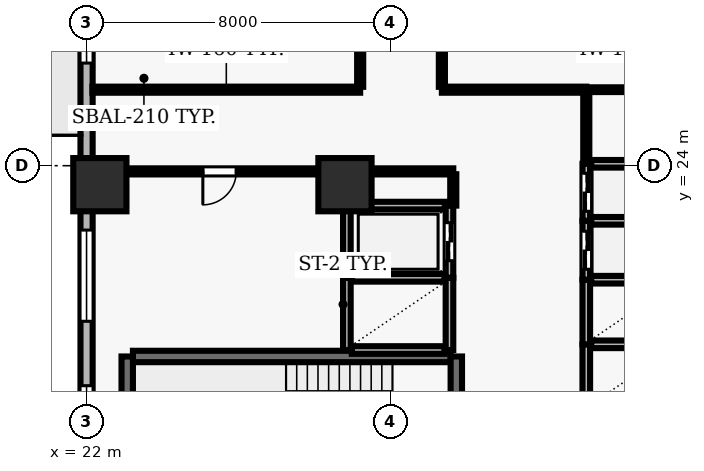
"""IFC4 building model, lengths in metres.
Left out: names, types, materials, properties, quantities, classifications, styles, units other than length and angle.
Written with IfcOpenShell. Run it as: python <this file> out.ifc"""

import sys

from ifc_helpers import new_model, si_unit, direction, frame, frame_2d, origin, origin_2d, place, context, subcontext, project, spatial, rectangle, extrude, element, fill, save


model = new_model("IFC4")
c1 = context("Model", 3, precision=1e-05, world=origin(), true_north=direction((0.0, 1.0)))
c2 = subcontext(c1, "Body", "Model", "MODEL_VIEW")
j1 = project(units=[si_unit("LENGTHUNIT", "METRE"), si_unit("PLANEANGLEUNIT", "RADIAN")], contexts=[c1])
p1 = place(None, origin())
s1 = spatial("IfcSite", under=j1, at=p1, CompositionType="ELEMENT")
p2 = place(p1, origin())
s2 = spatial("IfcBuilding", under=s1, at=p2, CompositionType="ELEMENT")
p3 = place(p2, frame((0.0, 0.0, 81.7)))
s3 = spatial("IfcBuildingStorey", under=s2, at=p3, CompositionType="ELEMENT", Elevation=81.7)
for number, where, z_axis, x_axis in (
    (1, (22.35, 23.5, 0.0), (0.0, 0.0, 1.0), (1.0, 0.0, 0.0)),
    (2, (28.8, 23.5, 0.0), (0.0, 0.0, 1.0), (1.0, 0.0, 0.0)),
):
    element("IfcColumn", number, at=place(p3, frame(where, z_axis=z_axis, x_axis=x_axis)), inside=s3, PredefinedType="COLUMN", context=c2, shape_type="SweptSolid", body=[
        extrude(rectangle(XDim=1.4, YDim=1.4, at=origin_2d()), origin(), (0.0, 0.0, 1.0), 3.9),
    ])
p4 = place(p3, frame((22.0, 51.5, 0.0), z_axis=(0.0, 0.0, 1.0), x_axis=(0.0, -1.0, 0.0)))
e3 = element("IfcWall", 3, at=p4, inside=s3, PredefinedType="SOLIDWALL", context=c2, shape_type="SweptSolid", body=[
    extrude(rectangle(XDim=49.0, YDim=0.32, at=frame_2d((24.5, 0.0))), origin(), (0.0, 0.0, 1.0), 3.69),
])
p5 = place(p4, frame((12.1, 0.0, 0.0)))
e4 = element("IfcOpeningElement", 4, at=p5, cuts=e3, PredefinedType="OPENING", context=c2, shape_type="SweptSolid", body=[
    extrude(rectangle(XDim=1.0, YDim=2.2, at=frame_2d((0.5, 1.1))), frame((0.0, 0.17, 0.0), z_axis=(0.0, -1.0, 0.0), x_axis=(1.0, 0.0, 0.0)), (0.0, 0.0, 1.0), 0.34),
])
p6 = place(p4, frame((1.522, 0.0, 0.9)))
e5 = element("IfcOpeningElement", 5, at=p6, cuts=e3, PredefinedType="OPENING", context=c2, shape_type="SweptSolid", body=[
    extrude(rectangle(XDim=2.4, YDim=1.8, at=frame_2d((1.2, 0.9))), frame((0.0, 0.17, 0.0), z_axis=(0.0, -1.0, 0.0), x_axis=(1.0, 0.0, 0.0)), (0.0, 0.0, 1.0), 0.34),
])
p7 = place(p4, frame((6.967, 0.0, 0.9)))
e6 = element("IfcOpeningElement", 6, at=p7, cuts=e3, PredefinedType="OPENING", context=c2, shape_type="SweptSolid", body=[
    extrude(rectangle(XDim=2.4, YDim=1.8, at=frame_2d((1.2, 0.9))), frame((0.0, 0.17, 0.0), z_axis=(0.0, -1.0, 0.0), x_axis=(1.0, 0.0, 0.0)), (0.0, 0.0, 1.0), 0.34),
])
p8 = place(p4, frame((22.4, 0.0, 0.9)))
e7 = element("IfcOpeningElement", 7, at=p8, cuts=e3, PredefinedType="OPENING", context=c2, shape_type="SweptSolid", body=[
    extrude(rectangle(XDim=2.4, YDim=1.8, at=frame_2d((1.2, 0.9))), frame((0.0, 0.17, 0.0), z_axis=(0.0, -1.0, 0.0), x_axis=(1.0, 0.0, 0.0)), (0.0, 0.0, 1.0), 0.34),
])
p9 = place(p4, frame((29.194, 0.0, 0.9)))
e8 = element("IfcOpeningElement", 8, at=p9, cuts=e3, PredefinedType="OPENING", context=c2, shape_type="SweptSolid", body=[
    extrude(rectangle(XDim=2.4, YDim=1.8, at=frame_2d((1.2, 0.9))), frame((0.0, 0.17, 0.0), z_axis=(0.0, -1.0, 0.0), x_axis=(1.0, 0.0, 0.0)), (0.0, 0.0, 1.0), 0.34),
])
p10 = place(p4, frame((33.289, 0.0, 0.9)))
e9 = element("IfcOpeningElement", 9, at=p10, cuts=e3, PredefinedType="OPENING", context=c2, shape_type="SweptSolid", body=[
    extrude(rectangle(XDim=2.4, YDim=1.8, at=frame_2d((1.2, 0.9))), frame((0.0, 0.17, 0.0), z_axis=(0.0, -1.0, 0.0), x_axis=(1.0, 0.0, 0.0)), (0.0, 0.0, 1.0), 0.34),
])
p11 = place(p4, frame((39.633, 0.0, 0.9)))
e10 = element("IfcOpeningElement", 10, at=p11, cuts=e3, PredefinedType="OPENING", context=c2, shape_type="SweptSolid", body=[
    extrude(rectangle(XDim=2.4, YDim=1.8, at=frame_2d((1.2, 0.9))), frame((0.0, 0.17, 0.0), z_axis=(0.0, -1.0, 0.0), x_axis=(1.0, 0.0, 0.0)), (0.0, 0.0, 1.0), 0.34),
])
p12 = place(p3, frame((31.58, 18.98, 0.0), z_axis=(0.0, 0.0, 1.0), x_axis=(-1.0, 0.0, 0.0)))
e11 = element("IfcWall", 11, at=p12, inside=s3, PredefinedType="SHEAR", context=c2, shape_type="SweptSolid", body=[
    extrude(rectangle(XDim=8.36, YDim=0.3, at=frame_2d((4.18, 0.0))), origin(), (0.0, 0.0, 1.0), 3.69),
])
p13 = place(p3, frame((23.07, 18.98, 0.0), z_axis=(0.0, 0.0, 1.0), x_axis=(0.0, -1.0, 0.0)))
e12 = element("IfcWall", 12, at=p13, inside=s3, PredefinedType="SHEAR", context=c2, shape_type="SweptSolid", body=[
    extrude(rectangle(XDim=3.51, YDim=0.3, at=frame_2d((1.755, 0.0))), origin(), (0.0, 0.0, 1.0), 3.69),
])
p14 = place(p3, frame((31.73, 15.47, 0.0), z_axis=(0.0, 0.0, 1.0), x_axis=(0.0, 1.0, 0.0)))
e13 = element("IfcWall", 13, at=p14, inside=s3, PredefinedType="SHEAR", context=c2, shape_type="SweptSolid", body=[
    extrude(rectangle(XDim=3.51, YDim=0.3, at=frame_2d((1.755, 0.0))), origin(), (0.0, 0.0, 1.0), 3.69),
])
p15 = place(p14, frame((1.18, 0.0, 0.0)))
e14 = element("IfcOpeningElement", 14, at=p15, cuts=e13, PredefinedType="OPENING", context=c2, shape_type="SweptSolid", body=[
    extrude(rectangle(XDim=1.15, YDim=2.15, at=frame_2d((0.575, 1.075))), frame((0.0, 0.16, 0.0), z_axis=(0.0, -1.0, 0.0), x_axis=(1.0, 0.0, 0.0)), (0.0, 0.0, 1.0), 0.32),
])
p16 = place(p3, frame((35.15, 19.3, 0.0), z_axis=(0.0, 0.0, 1.0), x_axis=(0.0, -1.0, 0.0)))
e15 = element("IfcWall", 15, at=p16, inside=s3, PredefinedType="SOLIDWALL", context=c2, shape_type="SweptSolid", body=[
    extrude(rectangle(XDim=1.7, YDim=0.2, at=frame_2d((0.85, 0.0))), origin(), (0.0, 0.0, 1.0), 3.69),
])
p17 = place(p3, frame((37.42, 19.3, 0.0), z_axis=(0.0, 0.0, 1.0), x_axis=(-1.0, 0.0, 0.0)))
e16 = element("IfcWall", 16, at=p17, inside=s3, PredefinedType="SOLIDWALL", context=c2, shape_type="SweptSolid", body=[
    extrude(rectangle(XDim=2.14, YDim=0.2, at=frame_2d((1.07, 0.0))), origin(), (0.0, 0.0, 1.0), 3.69),
])
p18 = place(p3, frame((35.15, 21.0, 0.0), z_axis=(0.0, 0.0, 1.0), x_axis=(0.0, -1.0, 0.0)))
e17 = element("IfcWall", 17, at=p18, inside=s3, PredefinedType="SOLIDWALL", context=c2, shape_type="SweptSolid", body=[
    extrude(rectangle(XDim=1.7, YDim=0.2, at=frame_2d((0.85, 0.0))), origin(), (0.0, 0.0, 1.0), 3.69),
])
p19 = place(p3, frame((37.42, 21.0, 0.0), z_axis=(0.0, 0.0, 1.0), x_axis=(-1.0, 0.0, 0.0)))
e18 = element("IfcWall", 18, at=p19, inside=s3, PredefinedType="SOLIDWALL", context=c2, shape_type="SweptSolid", body=[
    extrude(rectangle(XDim=2.14, YDim=0.2, at=frame_2d((1.07, 0.0))), origin(), (0.0, 0.0, 1.0), 3.69),
])
for number, where, z_axis, x_axis in (
    (19, (28.85, 21.05, 0.0), (0.0, 0.0, 1.0), (0.0, -1.0, 0.0)),
    (20, (31.55, 19.15, 0.0), (0.0, 0.0, 1.0), (0.0, 1.0, 0.0)),
):
    element("IfcWall", number, at=place(p3, frame(where, z_axis=z_axis, x_axis=x_axis)), inside=s3, PredefinedType="SOLIDWALL", context=c2, shape_type="SweptSolid", body=[
        extrude(rectangle(XDim=1.9, YDim=0.2, at=frame_2d((0.95, 0.0))), origin(), (0.0, 0.0, 1.0), 3.69),
    ])
for number, where, z_axis, x_axis in (
    (21, (28.98, 19.15, 0.0), (0.0, 0.0, 1.0), (1.0, 0.0, 0.0)),
    (22, (31.42, 21.05, 0.0), (0.0, 0.0, 1.0), (-1.0, 0.0, 0.0)),
):
    element("IfcWall", number, at=place(p3, frame(where, z_axis=z_axis, x_axis=x_axis)), inside=s3, PredefinedType="SOLIDWALL", context=c2, shape_type="SweptSolid", body=[
        extrude(rectangle(XDim=2.44, YDim=0.2, at=frame_2d((1.22, 0.0))), origin(), (0.0, 0.0, 1.0), 3.69),
    ])
p20 = place(p3, frame((35.15, 22.55, 0.0), z_axis=(0.0, 0.0, 1.0), x_axis=(0.0, -1.0, 0.0)))
e23 = element("IfcWall", 23, at=p20, inside=s3, PredefinedType="SOLIDWALL", context=c2, shape_type="SweptSolid", body=[
    extrude(rectangle(XDim=1.55, YDim=0.2, at=frame_2d((0.775, 0.0))), origin(), (0.0, 0.0, 1.0), 3.69),
])
p21 = place(p20, frame((0.275, 0.0, 0.0)))
e24 = element("IfcOpeningElement", 24, at=p21, cuts=e23, PredefinedType="OPENING", context=c2, shape_type="SweptSolid", body=[
    extrude(rectangle(XDim=1.0, YDim=2.1, at=frame_2d((0.5, 1.05))), frame((0.0, 0.11, 0.0), z_axis=(0.0, -1.0, 0.0), x_axis=(1.0, 0.0, 0.0)), (0.0, 0.0, 1.0), 0.22),
])
p22 = place(p3, frame((37.42, 22.55, 0.0), z_axis=(0.0, 0.0, 1.0), x_axis=(-1.0, 0.0, 0.0)))
e25 = element("IfcWall", 25, at=p22, inside=s3, PredefinedType="SOLIDWALL", context=c2, shape_type="SweptSolid", body=[
    extrude(rectangle(XDim=2.14, YDim=0.2, at=frame_2d((1.07, 0.0))), origin(), (0.0, 0.0, 1.0), 3.69),
])
p23 = place(p3, frame((35.15, 24.05, 0.0), z_axis=(0.0, 0.0, 1.0), x_axis=(0.0, -1.0, 0.0)))
e26 = element("IfcWall", 26, at=p23, inside=s3, PredefinedType="SOLIDWALL", context=c2, shape_type="SweptSolid", body=[
    extrude(rectangle(XDim=1.5, YDim=0.2, at=frame_2d((0.75, 0.0))), origin(), (0.0, 0.0, 1.0), 3.69),
])
p24 = place(p23, frame((0.25, 0.0, 0.0)))
e27 = element("IfcOpeningElement", 27, at=p24, cuts=e26, PredefinedType="OPENING", context=c2, shape_type="SweptSolid", body=[
    extrude(rectangle(XDim=1.0, YDim=2.1, at=frame_2d((0.5, 1.05))), frame((0.0, 0.11, 0.0), z_axis=(0.0, -1.0, 0.0), x_axis=(1.0, 0.0, 0.0)), (0.0, 0.0, 1.0), 0.22),
])
p25 = place(p3, frame((37.42, 24.05, 0.0), z_axis=(0.0, 0.0, 1.0), x_axis=(-1.0, 0.0, 0.0)))
e28 = element("IfcWall", 28, at=p25, inside=s3, PredefinedType="SOLIDWALL", context=c2, shape_type="SweptSolid", body=[
    extrude(rectangle(XDim=2.14, YDim=0.2, at=frame_2d((1.07, 0.0))), origin(), (0.0, 0.0, 1.0), 3.69),
])
p26 = place(p3, frame((28.85, 22.95, 0.0), z_axis=(0.0, 0.0, 1.0), x_axis=(0.0, -1.0, 0.0)))
e29 = element("IfcWall", 29, at=p26, inside=s3, PredefinedType="SOLIDWALL", context=c2, shape_type="SweptSolid", body=[
    extrude(rectangle(XDim=1.9, YDim=0.2, at=frame_2d((0.95, 0.0))), origin(), (0.0, 0.0, 1.0), 3.69),
])
p27 = place(p3, frame((31.55, 21.05, 0.0), z_axis=(0.0, 0.0, 1.0), x_axis=(0.0, 1.0, 0.0)))
e30 = element("IfcWall", 30, at=p27, inside=s3, PredefinedType="SOLIDWALL", context=c2, shape_type="SweptSolid", body=[
    extrude(rectangle(XDim=1.9, YDim=0.2, at=frame_2d((0.95, 0.0))), origin(), (0.0, 0.0, 1.0), 3.69),
])
p28 = place(p27, frame((0.45, 0.0, 0.0)))
e31 = element("IfcOpeningElement", 31, at=p28, cuts=e30, PredefinedType="OPENING", context=c2, shape_type="SweptSolid", body=[
    extrude(rectangle(XDim=1.0, YDim=2.1, at=frame_2d((0.5, 1.05))), frame((0.0, 0.11, 0.0), z_axis=(0.0, -1.0, 0.0), x_axis=(1.0, 0.0, 0.0)), (0.0, 0.0, 1.0), 0.22),
])
p29 = place(p3, frame((31.43, 22.95, 0.0), z_axis=(0.0, 0.0, 1.0), x_axis=(-1.0, 0.0, 0.0)))
e32 = element("IfcWall", 32, at=p29, inside=s3, PredefinedType="SOLIDWALL", context=c2, shape_type="SweptSolid", body=[
    extrude(rectangle(XDim=2.46, YDim=0.2, at=frame_2d((1.23, 0.0))), origin(), (0.0, 0.0, 1.0), 3.69),
])
p30 = place(p3, frame((28.8, 23.85, 0.0), z_axis=(0.0, 0.0, 1.0), x_axis=(-1.0, 0.0, 0.0)))
e33 = element("IfcWall", 33, at=p30, inside=s3, PredefinedType="PARTITIONING", context=c2, shape_type="SweptSolid", body=[
    extrude(rectangle(XDim=6.6, YDim=0.16, at=frame_2d((3.3, 0.0))), origin(), (0.0, 0.0, 1.0), 3.055),
])
p31 = place(p30, frame((2.86, 0.0, 0.0)))
e34 = element("IfcOpeningElement", 34, at=p31, cuts=e33, PredefinedType="OPENING", context=c2, shape_type="SweptSolid", body=[
    extrude(rectangle(XDim=0.88, YDim=2.1, at=frame_2d((0.44, 1.05))), frame((0.0, 0.09, 0.0), z_axis=(0.0, -1.0, 0.0), x_axis=(1.0, 0.0, 0.0)), (0.0, 0.0, 1.0), 0.18),
])
p32 = place(p3, frame((28.8, 23.85, 0.0), z_axis=(0.0, 0.0, 1.0), x_axis=(1.0, 0.0, 0.0)))
e35 = element("IfcWall", 35, at=p32, inside=s3, PredefinedType="PARTITIONING", context=c2, shape_type="SweptSolid", body=[
    extrude(rectangle(XDim=2.85, YDim=0.16, at=frame_2d((1.425, 0.0))), origin(), (0.0, 0.0, 1.0), 3.69),
])
p33 = place(p3, frame((29.2, 26.0, 0.0), z_axis=(0.0, 0.0, 1.0), x_axis=(-1.0, 0.0, 0.0)))
e36 = element("IfcWall", 36, at=p33, inside=s3, PredefinedType="PARTITIONING", context=c2, shape_type="SweptSolid", body=[
    extrude(rectangle(XDim=7.045, YDim=0.16, at=frame_2d((3.522, 0.0))), origin(), (0.0, 0.0, 1.0), 3.69),
])
p34 = place(p3, frame((35.15, 26.0, 0.0), z_axis=(0.0, 0.0, 1.0), x_axis=(-1.0, 0.0, 0.0)))
e37 = element("IfcWall", 37, at=p34, inside=s3, PredefinedType="PARTITIONING", context=c2, shape_type="SweptSolid", body=[
    extrude(rectangle(XDim=3.8, YDim=0.16, at=frame_2d((1.9, 0.0))), origin(), (0.0, 0.0, 1.0), 3.69),
])
p35 = place(p3, frame((35.15, 26.0, 0.0), z_axis=(0.0, 0.0, 1.0), x_axis=(1.0, 0.0, 0.0)))
e38 = element("IfcWall", 38, at=p35, inside=s3, PredefinedType="PARTITIONING", context=c2, shape_type="SweptSolid", body=[
    extrude(rectangle(XDim=2.695, YDim=0.125, at=frame_2d((1.348, 0.0))), origin(), (0.0, 0.0, 1.0), 3.69),
])
p36 = place(p3, frame((28.8, 22.95, 0.0), z_axis=(0.0, 0.0, 1.0), x_axis=(0.0, 1.0, 0.0)))
e39 = element("IfcWall", 39, at=p36, inside=s3, PredefinedType="PARTITIONING", context=c2, shape_type="SweptSolid", body=[
    extrude(rectangle(XDim=0.825, YDim=0.135, at=frame_2d((0.413, 0.0))), origin(), (0.0, 0.0, 1.0), 3.69),
])
p37 = place(p3, frame((29.2, 33.195, 0.0), z_axis=(0.0, 0.0, 1.0), x_axis=(0.0, -1.0, 0.0)))
e40 = element("IfcWall", 40, at=p37, inside=s3, PredefinedType="PARTITIONING", context=c2, shape_type="SweptSolid", body=[
    extrude(rectangle(XDim=7.12, YDim=0.16, at=frame_2d((3.56, 0.0))), origin(), (0.0, 0.0, 1.0), 3.69),
])
p38 = place(p37, frame((3.11, 0.0, 0.0)))
e41 = element("IfcOpeningElement", 41, at=p38, cuts=e40, PredefinedType="OPENING", context=c2, shape_type="SweptSolid", body=[
    extrude(rectangle(XDim=0.9, YDim=2.1, at=frame_2d((0.45, 1.05))), frame((0.0, 0.09, 0.0), z_axis=(0.0, -1.0, 0.0), x_axis=(1.0, 0.0, 0.0)), (0.0, 0.0, 1.0), 0.18),
])
p39 = place(p3, frame((31.35, 26.075, 0.0), z_axis=(0.0, 0.0, 1.0), x_axis=(0.0, 1.0, 0.0)))
e42 = element("IfcWall", 42, at=p39, inside=s3, PredefinedType="PARTITIONING", context=c2, shape_type="SweptSolid", body=[
    extrude(rectangle(XDim=7.137, YDim=0.16, at=frame_2d((3.568, 0.0))), origin(), (0.0, 0.0, 1.0), 3.69),
])
p40 = place(p39, frame((3.119, 0.0, 0.0)))
e43 = element("IfcOpeningElement", 43, at=p40, cuts=e42, PredefinedType="OPENING", context=c2, shape_type="SweptSolid", body=[
    extrude(rectangle(XDim=0.9, YDim=2.1, at=frame_2d((0.45, 1.05))), frame((0.0, 0.09, 0.0), z_axis=(0.0, -1.0, 0.0), x_axis=(1.0, 0.0, 0.0)), (0.0, 0.0, 1.0), 0.18),
])
p41 = place(p3, frame((31.65, 23.775, 0.0), z_axis=(0.0, 0.0, 1.0), x_axis=(0.0, -1.0, 0.0)))
e44 = element("IfcWall", 44, at=p41, inside=s3, PredefinedType="PARTITIONING", context=c2, shape_type="SweptSolid", body=[
    extrude(rectangle(XDim=0.825, YDim=0.16, at=frame_2d((0.413, 0.0))), origin(), (0.0, 0.0, 1.0), 3.69),
])
p42 = place(p3, frame((35.15, 24.07, 0.0), z_axis=(0.0, 0.0, 1.0), x_axis=(0.0, 1.0, 0.0)))
e45 = element("IfcWall", 45, at=p42, inside=s3, PredefinedType="PARTITIONING", context=c2, shape_type="SweptSolid", body=[
    extrude(rectangle(XDim=1.855, YDim=0.16, at=frame_2d((0.927, 0.0))), origin(), (0.0, 0.0, 1.0), 3.69),
])
p43 = place(p8, origin())
e46 = element("IfcWindow", 46, at=p43, inside=s3, PartitioningType="SINGLE_PANEL", PredefinedType="WINDOW", context=c2, shape_type="SweptSolid", body=[
    extrude(rectangle(XDim=2.4, YDim=1.8, at=frame_2d((1.2, 0.9))), frame((0.0, 0.03, 0.0), z_axis=(0.0, -1.0, 0.0), x_axis=(1.0, 0.0, 0.0)), (0.0, 0.0, 1.0), 0.06),
])
fill(e7, e46)
p44 = place(p9, origin())
e47 = element("IfcWindow", 47, at=p44, inside=s3, PartitioningType="SINGLE_PANEL", PredefinedType="WINDOW", context=c2, shape_type="SweptSolid", body=[
    extrude(rectangle(XDim=2.4, YDim=1.8, at=frame_2d((1.2, 0.9))), frame((0.0, 0.03, 0.0), z_axis=(0.0, -1.0, 0.0), x_axis=(1.0, 0.0, 0.0)), (0.0, 0.0, 1.0), 0.06),
])
fill(e8, e47)
p45 = place(p10, origin())
e48 = element("IfcWindow", 48, at=p45, inside=s3, PartitioningType="SINGLE_PANEL", PredefinedType="WINDOW", context=c2, shape_type="SweptSolid", body=[
    extrude(rectangle(XDim=2.4, YDim=1.8, at=frame_2d((1.2, 0.9))), frame((0.0, 0.03, 0.0), z_axis=(0.0, -1.0, 0.0), x_axis=(1.0, 0.0, 0.0)), (0.0, 0.0, 1.0), 0.06),
])
fill(e9, e48)
p46 = place(p21, origin())
e49 = element("IfcDoor", 49, at=p46, inside=s3, OperationType="DOUBLE_DOOR_SLIDING", PredefinedType="DOOR", context=c2, shape_type="SweptSolid", body=[
    extrude(rectangle(XDim=1.0, YDim=2.1, at=frame_2d((0.5, 1.05))), frame((0.0, 0.025, 0.0), z_axis=(0.0, -1.0, 0.0), x_axis=(1.0, 0.0, 0.0)), (0.0, 0.0, 1.0), 0.05),
])
fill(e24, e49)
p47 = place(p24, origin())
e50 = element("IfcDoor", 50, at=p47, inside=s3, OperationType="DOUBLE_DOOR_SLIDING", PredefinedType="DOOR", context=c2, shape_type="SweptSolid", body=[
    extrude(rectangle(XDim=1.0, YDim=2.1, at=frame_2d((0.5, 1.05))), frame((0.0, 0.025, 0.0), z_axis=(0.0, -1.0, 0.0), x_axis=(1.0, 0.0, 0.0)), (0.0, 0.0, 1.0), 0.05),
])
fill(e27, e50)
p48 = place(p28, origin())
e51 = element("IfcDoor", 51, at=p48, inside=s3, OperationType="DOUBLE_DOOR_SLIDING", PredefinedType="DOOR", context=c2, shape_type="SweptSolid", body=[
    extrude(rectangle(XDim=1.0, YDim=2.1, at=frame_2d((0.5, 1.05))), frame((0.0, 0.025, 0.0), z_axis=(0.0, -1.0, 0.0), x_axis=(1.0, 0.0, 0.0)), (0.0, 0.0, 1.0), 0.05),
])
fill(e31, e51)
p49 = place(p31, origin())
e52 = element("IfcDoor", 52, at=p49, inside=s3, OperationType="SINGLE_SWING_RIGHT", PredefinedType="DOOR", context=c2, shape_type="SweptSolid", body=[
    extrude(rectangle(XDim=0.88, YDim=2.1, at=frame_2d((0.44, 1.05))), frame((0.0, 0.025, 0.0), z_axis=(0.0, -1.0, 0.0), x_axis=(1.0, 0.0, 0.0)), (0.0, 0.0, 1.0), 0.05),
])
fill(e34, e52)
save(model, sys.argv[1])
